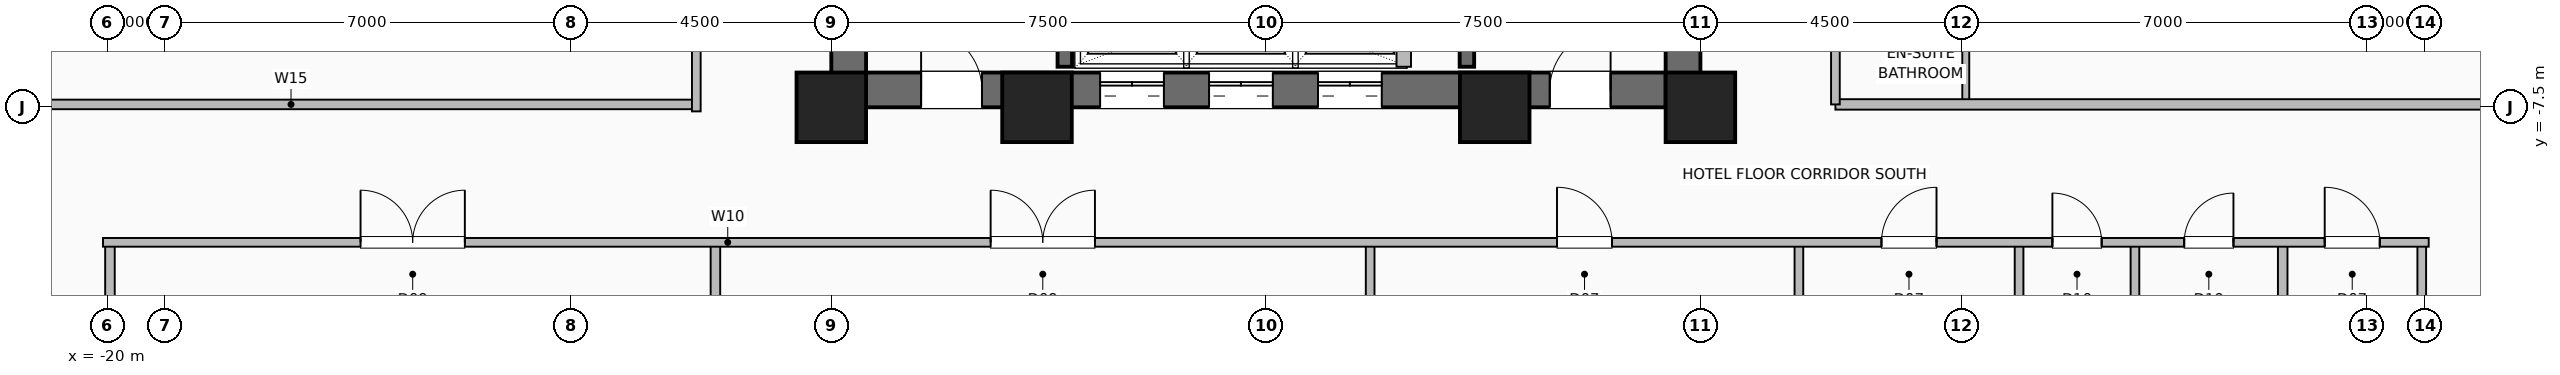
"""IFC4 building model, lengths in metres.
Left out: names, types, materials, properties, quantities, classifications, styles, units other than length and angle.
Written with IfcOpenShell. Run it as: python <this file> out.ifc"""

import sys

from ifc_helpers import new_model, si_unit, direction, frame, frame_2d, origin, origin_2d, place, context, subcontext, project, spatial, rectangle, hollow_rectangle, extrude, element, fill, save


model = new_model("IFC4")
c1 = context("Model", 3, precision=1e-05, world=origin(), true_north=direction((0.0, 1.0)))
c2 = subcontext(c1, "Body", "Model", "MODEL_VIEW")
j1 = project(units=[si_unit("LENGTHUNIT", "METRE"), si_unit("PLANEANGLEUNIT", "RADIAN")], contexts=[c1])
p1 = place(None, origin())
s1 = spatial("IfcSite", under=j1, at=p1, CompositionType="ELEMENT")
p2 = place(p1, origin())
s2 = spatial("IfcBuilding", under=s1, at=p2, CompositionType="ELEMENT")
p3 = place(p2, frame((0.0, 0.0, 69.0)))
s3 = spatial("IfcBuildingStorey", under=s2, at=p3, CompositionType="ELEMENT", Elevation=69.0)
for number, where, z_axis, x_axis in (
    (1, (-7.5, -7.5, 0.0), (0.0, 0.0, 1.0), (1.0, 0.0, 0.0)),
    (2, (-3.95, -7.5, 0.0), (0.0, 0.0, 1.0), (1.0, 0.0, 0.0)),
    (3, (3.95, -7.5, 0.0), (0.0, 0.0, 1.0), (1.0, 0.0, 0.0)),
    (4, (7.5, -7.5, 0.0), (0.0, 0.0, 1.0), (1.0, 0.0, 0.0)),
):
    element("IfcColumn", number, at=place(p3, frame(where, z_axis=z_axis, x_axis=x_axis)), inside=s3, PredefinedType="COLUMN", context=c2, shape_type="SweptSolid", body=[
        extrude(hollow_rectangle(XDim=1.2, YDim=1.2, WallThickness=0.055, at=origin_2d()), origin(), (0.0, 0.0, 1.0), 3.5),
    ])
p4 = place(p3, frame((-7.5, -7.2, 0.0), z_axis=(0.0, 0.0, 1.0), x_axis=(1.0, 0.0, 0.0)))
e5 = element("IfcWall", 5, at=p4, inside=s3, PredefinedType="SHEAR", context=c2, shape_type="SweptSolid", body=[
    extrude(rectangle(XDim=15.0, YDim=0.6, at=frame_2d((7.5, 0.0))), origin(), (0.0, 0.0, 1.0), 3.25),
])
p5 = place(p4, frame((1.55, 0.0, 0.0)))
e6 = element("IfcOpeningElement", 6, at=p5, cuts=e5, PredefinedType="OPENING", context=c2, shape_type="SweptSolid", body=[
    extrude(rectangle(XDim=1.05, YDim=2.08, at=frame_2d((0.525, 1.04))), frame((0.0, 0.31, 0.0), z_axis=(0.0, -1.0, 0.0), x_axis=(1.0, 0.0, 0.0)), (0.0, 0.0, 1.0), 0.62),
])
p6 = place(p4, frame((12.4, 0.0, 0.0)))
e7 = element("IfcOpeningElement", 7, at=p6, cuts=e5, PredefinedType="OPENING", context=c2, shape_type="SweptSolid", body=[
    extrude(rectangle(XDim=1.05, YDim=2.08, at=frame_2d((0.525, 1.04))), frame((0.0, 0.31, 0.0), z_axis=(0.0, -1.0, 0.0), x_axis=(1.0, 0.0, 0.0)), (0.0, 0.0, 1.0), 0.62),
])
p7 = place(p4, frame((4.64, 0.0, 0.0)))
e8 = element("IfcOpeningElement", 8, at=p7, cuts=e5, PredefinedType="OPENING", context=c2, shape_type="SweptSolid", body=[
    extrude(rectangle(XDim=1.1, YDim=2.2, at=frame_2d((0.55, 1.1))), frame((0.0, 0.31, 0.0), z_axis=(0.0, -1.0, 0.0), x_axis=(1.0, 0.0, 0.0)), (0.0, 0.0, 1.0), 0.62),
])
p8 = place(p4, frame((6.52, 0.0, 0.0)))
e9 = element("IfcOpeningElement", 9, at=p8, cuts=e5, PredefinedType="OPENING", context=c2, shape_type="SweptSolid", body=[
    extrude(rectangle(XDim=1.1, YDim=2.2, at=frame_2d((0.55, 1.1))), frame((0.0, 0.31, 0.0), z_axis=(0.0, -1.0, 0.0), x_axis=(1.0, 0.0, 0.0)), (0.0, 0.0, 1.0), 0.62),
])
p9 = place(p4, frame((8.4, 0.0, 0.0)))
e10 = element("IfcOpeningElement", 10, at=p9, cuts=e5, PredefinedType="OPENING", context=c2, shape_type="SweptSolid", body=[
    extrude(rectangle(XDim=1.1, YDim=2.2, at=frame_2d((0.55, 1.1))), frame((0.0, 0.31, 0.0), z_axis=(0.0, -1.0, 0.0), x_axis=(1.0, 0.0, 0.0)), (0.0, 0.0, 1.0), 0.62),
])
p10 = place(p3, frame((-7.2, -7.5, 0.0), z_axis=(0.0, 0.0, 1.0), x_axis=(0.0, 1.0, 0.0)))
e11 = element("IfcWall", 11, at=p10, inside=s3, PredefinedType="SHEAR", context=c2, shape_type="SweptSolid", body=[
    extrude(rectangle(XDim=15.0, YDim=0.6, at=frame_2d((7.5, 0.0))), origin(), (0.0, 0.0, 1.0), 3.25),
])
p11 = place(p10, frame((9.5, 0.0, 0.0)))
e12 = element("IfcOpeningElement", 12, at=p11, cuts=e11, PredefinedType="OPENING", context=c2, shape_type="SweptSolid", body=[
    extrude(rectangle(XDim=1.0, YDim=2.08, at=frame_2d((0.5, 1.04))), frame((0.0, 0.31, 0.0), z_axis=(0.0, -1.0, 0.0), x_axis=(1.0, 0.0, 0.0)), (0.0, 0.0, 1.0), 0.62),
])
p12 = place(p3, frame((7.2, -7.5, 0.0), z_axis=(0.0, 0.0, 1.0), x_axis=(0.0, 1.0, 0.0)))
e13 = element("IfcWall", 13, at=p12, inside=s3, PredefinedType="SHEAR", context=c2, shape_type="SweptSolid", body=[
    extrude(rectangle(XDim=15.0, YDim=0.6, at=frame_2d((7.5, 0.0))), origin(), (0.0, 0.0, 1.0), 3.25),
])
for number, where, z_axis, x_axis in (
    (14, (-3.47, -6.8, 0.0), (0.0, 0.0, 1.0), (0.0, 1.0, 0.0)),
    (15, (3.47, -6.8, 0.0), (0.0, 0.0, 1.0), (0.0, 1.0, 0.0)),
):
    element("IfcWall", number, at=place(p3, frame(where, z_axis=z_axis, x_axis=x_axis)), inside=s3, PredefinedType="SHEAR", context=c2, shape_type="SweptSolid", body=[
        extrude(rectangle(XDim=7.72, YDim=0.25, at=frame_2d((3.86, 0.0))), origin(), (0.0, 0.0, 1.0), 3.25),
    ])
p13 = place(p3, frame((2.38, -6.8, 0.0), z_axis=(0.0, 0.0, 1.0), x_axis=(0.0, 1.0, 0.0)))
e16 = element("IfcWall", 16, at=p13, inside=s3, PredefinedType="SHEAR", context=c2, shape_type="SweptSolid", body=[
    extrude(rectangle(XDim=2.22, YDim=0.25, at=frame_2d((1.11, 0.0))), origin(), (0.0, 0.0, 1.0), 3.25),
])
for number, where, z_axis, x_axis in (
    (17, (17.55, -23.82, 0.0), (0.0, 0.0, 1.0), (0.0, 1.0, 0.0)),
    (18, (-19.95, -23.82, 0.0), (0.0, 0.0, 1.0), (0.0, 1.0, 0.0)),
    (19, (-9.5, -23.82, 0.0), (0.0, 0.0, 1.0), (0.0, 1.0, 0.0)),
):
    element("IfcWall", number, at=place(p3, frame(where, z_axis=z_axis, x_axis=x_axis)), inside=s3, PredefinedType="PLUMBINGWALL", context=c2, shape_type="SweptSolid", body=[
        extrude(rectangle(XDim=13.99, YDim=0.165, at=frame_2d((6.995, 0.0))), origin(), (0.0, 0.0, 1.0), 3.25),
    ])
for number, where, z_axis, x_axis in (
    (20, (1.8, -23.82, 0.0), (0.0, 0.0, 1.0), (0.0, 1.0, 0.0)),
    (21, (9.2, -23.82, 0.0), (0.0, 0.0, 1.0), (0.0, 1.0, 0.0)),
    (22, (13.0, -23.82, 0.0), (0.0, 0.0, 1.0), (0.0, 1.0, 0.0)),
    (23, (15.0, -23.82, 0.0), (0.0, 0.0, 1.0), (0.0, 1.0, 0.0)),
    (24, (19.95, -23.82, 0.0), (0.0, 0.0, 1.0), (0.0, 1.0, 0.0)),
):
    element("IfcWall", number, at=place(p3, frame(where, z_axis=z_axis, x_axis=x_axis)), inside=s3, PredefinedType="PARTITIONING", context=c2, shape_type="SweptSolid", body=[
        extrude(rectangle(XDim=13.99, YDim=0.15, at=frame_2d((6.995, 0.0))), origin(), (0.0, 0.0, 1.0), 3.25),
    ])
p14 = place(p3, frame((-20.07, -9.83, 0.0), z_axis=(0.0, 0.0, 1.0), x_axis=(1.0, 0.0, 0.0)))
e25 = element("IfcWall", 25, at=p14, inside=s3, PredefinedType="PARTITIONING", context=c2, shape_type="SweptSolid", body=[
    extrude(rectangle(XDim=40.14, YDim=0.15, at=frame_2d((20.07, 0.0))), origin(), (0.0, 0.0, 1.0), 3.25),
])
p15 = place(p14, frame((4.445, 0.0, 0.0)))
e26 = element("IfcOpeningElement", 26, at=p15, cuts=e25, PredefinedType="OPENING", context=c2, shape_type="SweptSolid", body=[
    extrude(rectangle(XDim=1.8, YDim=2.08, at=frame_2d((0.9, 1.04))), frame((0.0, 0.085, 0.0), z_axis=(0.0, -1.0, 0.0), x_axis=(1.0, 0.0, 0.0)), (0.0, 0.0, 1.0), 0.17),
])
p16 = place(p14, frame((15.32, 0.0, 0.0)))
e27 = element("IfcOpeningElement", 27, at=p16, cuts=e25, PredefinedType="OPENING", context=c2, shape_type="SweptSolid", body=[
    extrude(rectangle(XDim=1.8, YDim=2.08, at=frame_2d((0.9, 1.04))), frame((0.0, 0.085, 0.0), z_axis=(0.0, -1.0, 0.0), x_axis=(1.0, 0.0, 0.0)), (0.0, 0.0, 1.0), 0.17),
])
p17 = place(p14, frame((25.095, 0.0, 0.0)))
e28 = element("IfcOpeningElement", 28, at=p17, cuts=e25, PredefinedType="OPENING", context=c2, shape_type="SweptSolid", body=[
    extrude(rectangle(XDim=0.95, YDim=2.06, at=frame_2d((0.475, 1.03))), frame((0.0, 0.085, 0.0), z_axis=(0.0, -1.0, 0.0), x_axis=(1.0, 0.0, 0.0)), (0.0, 0.0, 1.0), 0.17),
])
p18 = place(p14, frame((30.695, 0.0, 0.0)))
e29 = element("IfcOpeningElement", 29, at=p18, cuts=e25, PredefinedType="OPENING", context=c2, shape_type="SweptSolid", body=[
    extrude(rectangle(XDim=0.95, YDim=2.06, at=frame_2d((0.475, 1.03))), frame((0.0, 0.085, 0.0), z_axis=(0.0, -1.0, 0.0), x_axis=(1.0, 0.0, 0.0)), (0.0, 0.0, 1.0), 0.17),
])
p19 = place(p14, frame((33.645, 0.0, 0.0)))
e30 = element("IfcOpeningElement", 30, at=p19, cuts=e25, PredefinedType="OPENING", context=c2, shape_type="SweptSolid", body=[
    extrude(rectangle(XDim=0.85, YDim=2.05, at=frame_2d((0.425, 1.025))), frame((0.0, 0.085, 0.0), z_axis=(0.0, -1.0, 0.0), x_axis=(1.0, 0.0, 0.0)), (0.0, 0.0, 1.0), 0.17),
])
p20 = place(p14, frame((35.92, 0.0, 0.0)))
e31 = element("IfcOpeningElement", 31, at=p20, cuts=e25, PredefinedType="OPENING", context=c2, shape_type="SweptSolid", body=[
    extrude(rectangle(XDim=0.85, YDim=2.05, at=frame_2d((0.425, 1.025))), frame((0.0, 0.085, 0.0), z_axis=(0.0, -1.0, 0.0), x_axis=(1.0, 0.0, 0.0)), (0.0, 0.0, 1.0), 0.17),
])
p21 = place(p14, frame((38.345, 0.0, 0.0)))
e32 = element("IfcOpeningElement", 32, at=p21, cuts=e25, PredefinedType="OPENING", context=c2, shape_type="SweptSolid", body=[
    extrude(rectangle(XDim=0.95, YDim=2.06, at=frame_2d((0.475, 1.03))), frame((0.0, 0.085, 0.0), z_axis=(0.0, -1.0, 0.0), x_axis=(1.0, 0.0, 0.0)), (0.0, 0.0, 1.0), 0.17),
])
p22 = place(p3, frame((-23.82, -7.45, 0.0), z_axis=(0.0, 0.0, 1.0), x_axis=(1.0, 0.0, 0.0)))
e33 = element("IfcWall", 33, at=p22, inside=s3, PredefinedType="PLUMBINGWALL", context=c2, shape_type="SweptSolid", body=[
    extrude(rectangle(XDim=13.99, YDim=0.165, at=frame_2d((6.995, 0.0))), origin(), (0.0, 0.0, 1.0), 3.25),
])
p23 = place(p3, frame((-9.83, -7.57, 0.0), z_axis=(0.0, 0.0, 1.0), x_axis=(0.0, 1.0, 0.0)))
e34 = element("IfcWall", 34, at=p23, inside=s3, PredefinedType="PARTITIONING", context=c2, shape_type="SweptSolid", body=[
    extrude(rectangle(XDim=15.14, YDim=0.15, at=frame_2d((7.57, 0.0))), origin(), (0.0, 0.0, 1.0), 3.25),
])
p24 = place(p23, frame((2.47, 0.0, 0.0)))
e35 = element("IfcOpeningElement", 35, at=p24, cuts=e34, PredefinedType="OPENING", context=c2, shape_type="SweptSolid", body=[
    extrude(rectangle(XDim=0.95, YDim=2.06, at=frame_2d((0.475, 1.03))), frame((0.0, 0.085, 0.0), z_axis=(0.0, -1.0, 0.0), x_axis=(1.0, 0.0, 0.0)), (0.0, 0.0, 1.0), 0.17),
])
p25 = place(p23, frame((8.595, 0.0, 0.0)))
e36 = element("IfcOpeningElement", 36, at=p25, cuts=e34, PredefinedType="OPENING", context=c2, shape_type="SweptSolid", body=[
    extrude(rectangle(XDim=0.95, YDim=2.06, at=frame_2d((0.475, 1.03))), frame((0.0, 0.085, 0.0), z_axis=(0.0, -1.0, 0.0), x_axis=(1.0, 0.0, 0.0)), (0.0, 0.0, 1.0), 0.17),
])
p26 = place(p23, frame((13.27, 0.0, 0.0)))
e37 = element("IfcOpeningElement", 37, at=p26, cuts=e34, PredefinedType="OPENING", context=c2, shape_type="SweptSolid", body=[
    extrude(rectangle(XDim=0.85, YDim=2.05, at=frame_2d((0.425, 1.025))), frame((0.0, 0.085, 0.0), z_axis=(0.0, -1.0, 0.0), x_axis=(1.0, 0.0, 0.0)), (0.0, 0.0, 1.0), 0.17),
])
p27 = place(p3, frame((12.08, -7.42, 0.0), z_axis=(0.0, 0.0, 1.0), x_axis=(0.0, 1.0, 0.0)))
e38 = element("IfcWall", 38, at=p27, inside=s3, PredefinedType="PLUMBINGWALL", context=c2, shape_type="SweptSolid", body=[
    extrude(rectangle(XDim=2.008, YDim=0.12, at=frame_2d((1.004, 0.0))), origin(), (0.0, 0.0, 1.0), 3.25),
])
p28 = place(p3, frame((9.83, -7.45, 0.0), z_axis=(0.0, 0.0, 1.0), x_axis=(1.0, 0.0, 0.0)))
e39 = element("IfcWall", 39, at=p28, inside=s3, PredefinedType="PARTITIONING", context=c2, shape_type="SweptSolid", body=[
    extrude(rectangle(XDim=13.99, YDim=0.18, at=frame_2d((6.995, 0.0))), origin(), (0.0, 0.0, 1.0), 3.25),
])
p29 = place(p3, frame((9.83, -7.45, 0.0), z_axis=(0.0, 0.0, 1.0), x_axis=(0.0, 1.0, 0.0)))
e40 = element("IfcWall", 40, at=p29, inside=s3, PredefinedType="PARTITIONING", context=c2, shape_type="SweptSolid", body=[
    extrude(rectangle(XDim=14.9, YDim=0.15, at=frame_2d((7.45, 0.0))), origin(), (0.0, 0.0, 1.0), 3.25),
])
p30 = place(p29, frame((3.049, 0.0, 0.0)))
e41 = element("IfcOpeningElement", 41, at=p30, cuts=e40, PredefinedType="OPENING", context=c2, shape_type="SweptSolid", body=[
    extrude(rectangle(XDim=0.95, YDim=2.08, at=frame_2d((0.475, 1.04))), frame((0.0, 0.085, 0.0), z_axis=(0.0, -1.0, 0.0), x_axis=(1.0, 0.0, 0.0)), (0.0, 0.0, 1.0), 0.17),
])
p31 = place(p29, frame((7.927, 0.0, 0.0)))
e42 = element("IfcOpeningElement", 42, at=p31, cuts=e40, PredefinedType="OPENING", context=c2, shape_type="SweptSolid", body=[
    extrude(rectangle(XDim=0.95, YDim=2.08, at=frame_2d((0.475, 1.04))), frame((0.0, 0.085, 0.0), z_axis=(0.0, -1.0, 0.0), x_axis=(1.0, 0.0, 0.0)), (0.0, 0.0, 1.0), 0.17),
])
p32 = place(p29, frame((12.899, 0.0, 0.0)))
e43 = element("IfcOpeningElement", 43, at=p32, cuts=e40, PredefinedType="OPENING", context=c2, shape_type="SweptSolid", body=[
    extrude(rectangle(XDim=0.95, YDim=2.08, at=frame_2d((0.475, 1.04))), frame((0.0, 0.085, 0.0), z_axis=(0.0, -1.0, 0.0), x_axis=(1.0, 0.0, 0.0)), (0.0, 0.0, 1.0), 0.17),
])
p33 = place(p5, origin())
e44 = element("IfcDoor", 44, at=p33, inside=s3, OperationType="SINGLE_SWING_LEFT", PredefinedType="DOOR", context=c2, shape_type="SweptSolid", body=[
    extrude(rectangle(XDim=1.05, YDim=2.08, at=frame_2d((0.525, 1.04))), frame((0.0, 0.025, 0.0), z_axis=(0.0, -1.0, 0.0), x_axis=(1.0, 0.0, 0.0)), (0.0, 0.0, 1.0), 0.05),
])
fill(e6, e44)
p34 = place(p6, origin())
e45 = element("IfcDoor", 45, at=p34, inside=s3, OperationType="SINGLE_SWING_RIGHT", PredefinedType="DOOR", context=c2, shape_type="SweptSolid", body=[
    extrude(rectangle(XDim=1.05, YDim=2.08, at=frame_2d((0.525, 1.04))), frame((0.0, 0.025, 0.0), z_axis=(0.0, -1.0, 0.0), x_axis=(1.0, 0.0, 0.0)), (0.0, 0.0, 1.0), 0.05),
])
fill(e7, e45)
p35 = place(p7, origin())
e46 = element("IfcDoor", 46, at=p35, inside=s3, OperationType="DOUBLE_DOOR_SLIDING", PredefinedType="DOOR", context=c2, shape_type="SweptSolid", body=[
    extrude(rectangle(XDim=1.1, YDim=2.2, at=frame_2d((0.55, 1.1))), frame((0.0, 0.025, 0.0), z_axis=(0.0, -1.0, 0.0), x_axis=(1.0, 0.0, 0.0)), (0.0, 0.0, 1.0), 0.05),
])
fill(e8, e46)
p36 = place(p8, origin())
e47 = element("IfcDoor", 47, at=p36, inside=s3, OperationType="DOUBLE_DOOR_SLIDING", PredefinedType="DOOR", context=c2, shape_type="SweptSolid", body=[
    extrude(rectangle(XDim=1.1, YDim=2.2, at=frame_2d((0.55, 1.1))), frame((0.0, 0.025, 0.0), z_axis=(0.0, -1.0, 0.0), x_axis=(1.0, 0.0, 0.0)), (0.0, 0.0, 1.0), 0.05),
])
fill(e9, e47)
p37 = place(p9, origin())
e48 = element("IfcDoor", 48, at=p37, inside=s3, OperationType="DOUBLE_DOOR_SLIDING", PredefinedType="DOOR", context=c2, shape_type="SweptSolid", body=[
    extrude(rectangle(XDim=1.1, YDim=2.2, at=frame_2d((0.55, 1.1))), frame((0.0, 0.025, 0.0), z_axis=(0.0, -1.0, 0.0), x_axis=(1.0, 0.0, 0.0)), (0.0, 0.0, 1.0), 0.05),
])
fill(e10, e48)
p38 = place(p15, origin())
e49 = element("IfcDoor", 49, at=p38, inside=s3, OperationType="DOUBLE_DOOR_SINGLE_SWING", PredefinedType="DOOR", context=c2, shape_type="SweptSolid", body=[
    extrude(rectangle(XDim=1.8, YDim=2.08, at=frame_2d((0.9, 1.04))), frame((0.0, 0.025, 0.0), z_axis=(0.0, -1.0, 0.0), x_axis=(1.0, 0.0, 0.0)), (0.0, 0.0, 1.0), 0.05),
])
fill(e26, e49)
p39 = place(p16, origin())
e50 = element("IfcDoor", 50, at=p39, inside=s3, OperationType="DOUBLE_DOOR_SINGLE_SWING", PredefinedType="DOOR", context=c2, shape_type="SweptSolid", body=[
    extrude(rectangle(XDim=1.8, YDim=2.08, at=frame_2d((0.9, 1.04))), frame((0.0, 0.025, 0.0), z_axis=(0.0, -1.0, 0.0), x_axis=(1.0, 0.0, 0.0)), (0.0, 0.0, 1.0), 0.05),
])
fill(e27, e50)
p40 = place(p17, origin())
e51 = element("IfcDoor", 51, at=p40, inside=s3, OperationType="SINGLE_SWING_LEFT", PredefinedType="DOOR", context=c2, shape_type="SweptSolid", body=[
    extrude(rectangle(XDim=0.95, YDim=2.06, at=frame_2d((0.475, 1.03))), frame((0.0, 0.025, 0.0), z_axis=(0.0, -1.0, 0.0), x_axis=(1.0, 0.0, 0.0)), (0.0, 0.0, 1.0), 0.05),
])
fill(e28, e51)
p41 = place(p18, origin())
e52 = element("IfcDoor", 52, at=p41, inside=s3, OperationType="SINGLE_SWING_RIGHT", PredefinedType="DOOR", context=c2, shape_type="SweptSolid", body=[
    extrude(rectangle(XDim=0.95, YDim=2.06, at=frame_2d((0.475, 1.03))), frame((0.0, 0.025, 0.0), z_axis=(0.0, -1.0, 0.0), x_axis=(1.0, 0.0, 0.0)), (0.0, 0.0, 1.0), 0.05),
])
fill(e29, e52)
p42 = place(p19, origin())
e53 = element("IfcDoor", 53, at=p42, inside=s3, OperationType="SINGLE_SWING_LEFT", PredefinedType="DOOR", context=c2, shape_type="SweptSolid", body=[
    extrude(rectangle(XDim=0.85, YDim=2.05, at=frame_2d((0.425, 1.025))), frame((0.0, 0.025, 0.0), z_axis=(0.0, -1.0, 0.0), x_axis=(1.0, 0.0, 0.0)), (0.0, 0.0, 1.0), 0.05),
])
fill(e30, e53)
p43 = place(p20, origin())
e54 = element("IfcDoor", 54, at=p43, inside=s3, OperationType="SINGLE_SWING_RIGHT", PredefinedType="DOOR", context=c2, shape_type="SweptSolid", body=[
    extrude(rectangle(XDim=0.85, YDim=2.05, at=frame_2d((0.425, 1.025))), frame((0.0, 0.025, 0.0), z_axis=(0.0, -1.0, 0.0), x_axis=(1.0, 0.0, 0.0)), (0.0, 0.0, 1.0), 0.05),
])
fill(e31, e54)
p44 = place(p21, origin())
e55 = element("IfcDoor", 55, at=p44, inside=s3, OperationType="SINGLE_SWING_LEFT", PredefinedType="DOOR", context=c2, shape_type="SweptSolid", body=[
    extrude(rectangle(XDim=0.95, YDim=2.06, at=frame_2d((0.475, 1.03))), frame((0.0, 0.025, 0.0), z_axis=(0.0, -1.0, 0.0), x_axis=(1.0, 0.0, 0.0)), (0.0, 0.0, 1.0), 0.05),
])
fill(e32, e55)
save(model, sys.argv[1])
